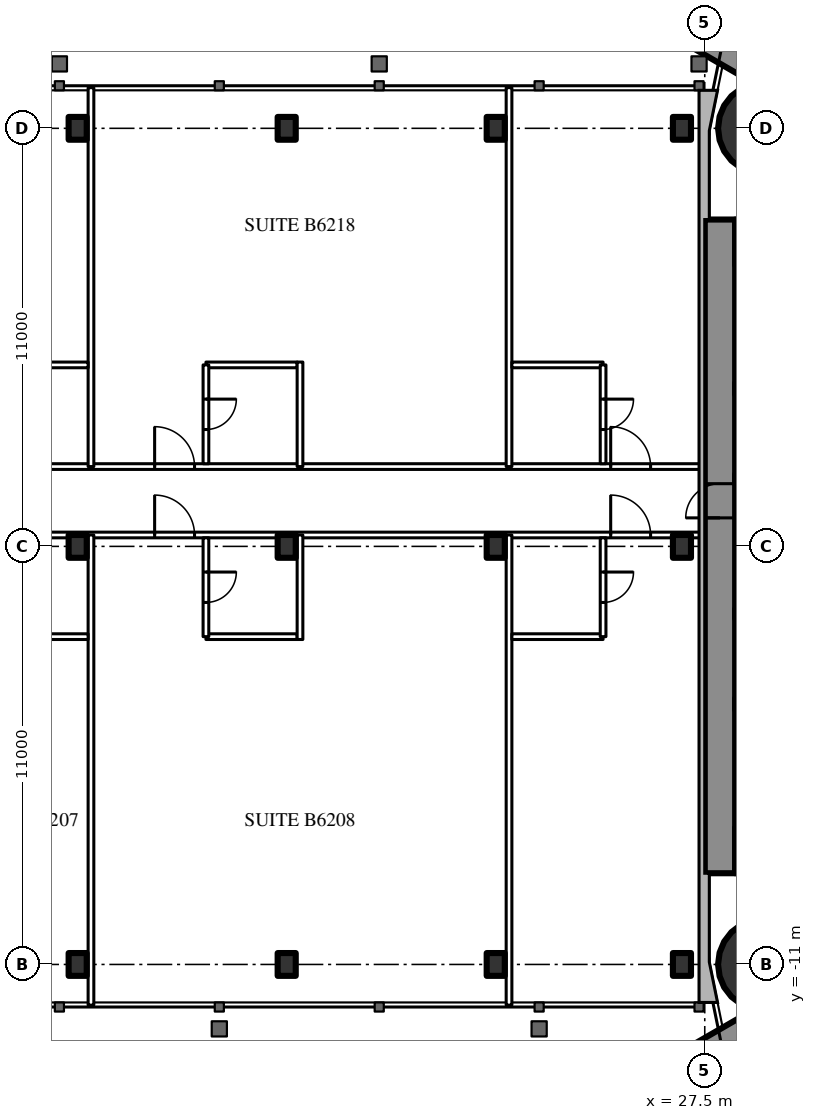
"""IFC4 building model, lengths in metres.
Left out: names, types, materials, properties, quantities, classifications, styles, units other than length and angle.
Written with IfcOpenShell. Run it as: python <this file> out.ifc"""

import sys

from ifc_helpers import new_model, si_unit, direction, frame, frame_2d, origin, origin_2d, place, context, subcontext, project, spatial, rectangle, circle, i_section, extrude, element, fill, save


model = new_model("IFC4")
c1 = context("Model", 3, precision=1e-05, world=origin(), true_north=direction((0.0, 1.0)))
c2 = subcontext(c1, "Body", "Model", "MODEL_VIEW")
j1 = project(units=[si_unit("LENGTHUNIT", "METRE"), si_unit("PLANEANGLEUNIT", "RADIAN")], contexts=[c1])
p1 = place(None, origin())
s1 = spatial("IfcSite", under=j1, at=p1, CompositionType="ELEMENT")
p2 = place(p1, origin())
s2 = spatial("IfcBuilding", under=s1, at=p2, CompositionType="ELEMENT")
p3 = place(p2, frame((0.0, 0.0, 233.3)))
s3 = spatial("IfcBuildingStorey", under=s2, at=p3, CompositionType="ELEMENT", Elevation=233.3)
for number, where, z_axis, x_axis in (
    (1, (29.05, 11.0, 0.0), (0.0, 0.0, 1.0), (1.0, 0.0, 0.0)),
    (2, (29.05, -11.0, 0.0), (0.0, 0.0, 1.0), (1.0, 0.0, 0.0)),
):
    element("IfcColumn", number, at=place(p3, frame(where, z_axis=z_axis, x_axis=x_axis)), inside=s3, PredefinedType="COLUMN", context=c2, shape_type="SweptSolid", body=[
        extrude(circle(Radius=1.2, at=origin_2d()), origin(), (0.0, 0.0, 1.0), 3.6),
    ])
p4 = place(p3, frame((27.9, -8.6, 0.0), z_axis=(0.0, 0.0, 1.0), x_axis=(0.0, 1.0, 0.0)))
e3 = element("IfcWall", 3, at=p4, inside=s3, PredefinedType="SHEAR", context=c2, shape_type="SweptSolid", body=[
    extrude(rectangle(XDim=17.2, YDim=0.8, at=frame_2d((8.6, 0.0))), origin(), (0.0, 0.0, 1.0), 3.6),
])
p5 = place(p4, frame((9.35, 0.0, 0.0)))
e4 = element("IfcOpeningElement", 4, at=p5, cuts=e3, PredefinedType="OPENING", context=c2, shape_type="SweptSolid", body=[
    extrude(rectangle(XDim=0.9, YDim=2.2, at=frame_2d((0.45, 1.1))), frame((0.0, 0.41, 0.0), z_axis=(0.0, -1.0, 0.0), x_axis=(1.0, 0.0, 0.0)), (0.0, 0.0, 1.0), 0.82),
])
p6 = place(p3, frame((28.3, -8.0, 0.0), z_axis=(0.0, 0.0, 1.0), x_axis=(1.0, 0.0, 0.0)))
e5 = element("IfcWall", 5, at=p6, inside=s3, PredefinedType="SHEAR", context=c2, shape_type="SweptSolid", body=[
    extrude(rectangle(XDim=8.4, YDim=1.2, at=frame_2d((4.2, 0.0))), origin(), (0.0, 0.0, 1.0), 3.6),
])
p7 = place(p6, frame((0.25, 0.0, 0.0)))
e6 = element("IfcOpeningElement", 6, at=p7, cuts=e5, PredefinedType="OPENING", context=c2, shape_type="SweptSolid", body=[
    extrude(rectangle(XDim=1.0, YDim=2.2, at=frame_2d((0.5, 1.1))), frame((0.0, 0.61, 0.0), z_axis=(0.0, -1.0, 0.0), x_axis=(1.0, 0.0, 0.0)), (0.0, 0.0, 1.0), 1.22),
])
p8 = place(p3, frame((28.3, 8.0, 0.0), z_axis=(0.0, 0.0, 1.0), x_axis=(1.0, 0.0, 0.0)))
e7 = element("IfcWall", 7, at=p8, inside=s3, PredefinedType="SHEAR", context=c2, shape_type="SweptSolid", body=[
    extrude(rectangle(XDim=8.4, YDim=1.2, at=frame_2d((4.2, 0.0))), origin(), (0.0, 0.0, 1.0), 3.6),
])
p9 = place(p8, frame((0.25, 0.0, 0.0)))
e8 = element("IfcOpeningElement", 8, at=p9, cuts=e7, PredefinedType="OPENING", context=c2, shape_type="SweptSolid", body=[
    extrude(rectangle(XDim=1.0, YDim=2.2, at=frame_2d((0.5, 1.1))), frame((0.0, 0.61, 0.0), z_axis=(0.0, -1.0, 0.0), x_axis=(1.0, 0.0, 0.0)), (0.0, 0.0, 1.0), 1.22),
])
for number, where, z_axis, x_axis in (
    (9, (28.3, -4.15, 0.0), (0.0, 0.0, 1.0), (1.0, 0.0, 0.0)),
    (10, (28.3, 4.15, 0.0), (0.0, 0.0, 1.0), (1.0, 0.0, 0.0)),
):
    element("IfcWall", number, at=place(p3, frame(where, z_axis=z_axis, x_axis=x_axis)), inside=s3, PredefinedType="SHEAR", context=c2, shape_type="SweptSolid", body=[
        extrude(rectangle(XDim=8.4, YDim=0.3, at=frame_2d((4.2, 0.0))), origin(), (0.0, 0.0, 1.0), 3.6),
    ])
for number, where, z_axis, x_axis in (
    (11, (28.3, -1.775, 0.0), (0.0, 0.0, 1.0), (1.0, 0.0, 0.0)),
    (12, (28.3, 1.775, 0.0), (0.0, 0.0, 1.0), (1.0, 0.0, 0.0)),
):
    element("IfcWall", number, at=place(p3, frame(where, z_axis=z_axis, x_axis=x_axis)), inside=s3, PredefinedType="SHEAR", context=c2, shape_type="SweptSolid", body=[
        extrude(rectangle(XDim=2.9, YDim=0.25, at=frame_2d((1.45, 0.0))), origin(), (0.0, 0.0, 1.0), 3.6),
    ])
p10 = place(p3, frame((27.2, -13.8, 0.0), z_axis=(0.0, 0.0, 1.0), x_axis=(0.866027159892, 0.499996958321, 0.0)))
e13 = element("IfcWall", 13, at=p10, inside=s3, PredefinedType="SHEAR", context=c2, shape_type="SweptSolid", body=[
    extrude(rectangle(XDim=27.947, YDim=1.2, at=frame_2d((13.973, 0.0))), origin(), (0.0, 0.0, 1.0), 3.6),
])
p11 = place(p10, frame((4.6, 0.0, 0.0)))
e14 = element("IfcOpeningElement", 14, at=p11, cuts=e13, PredefinedType="OPENING", context=c2, shape_type="SweptSolid", body=[
    extrude(rectangle(XDim=1.0, YDim=2.2, at=frame_2d((0.5, 1.1))), frame((0.0, 0.61, 0.0), z_axis=(0.0, -1.0, 0.0), x_axis=(1.0, 0.0, 0.0)), (0.0, 0.0, 1.0), 1.22),
])
p12 = place(p10, frame((13.395, 0.0, 0.0)))
e15 = element("IfcOpeningElement", 15, at=p12, cuts=e13, PredefinedType="OPENING", context=c2, shape_type="SweptSolid", body=[
    extrude(rectangle(XDim=1.8, YDim=2.2, at=frame_2d((0.9, 1.1))), frame((0.0, 0.61, 0.0), z_axis=(0.0, -1.0, 0.0), x_axis=(1.0, 0.0, 0.0)), (0.0, 0.0, 1.0), 1.22),
])
p13 = place(p3, frame((27.2, 13.8, 0.0), z_axis=(0.0, 0.0, 1.0), x_axis=(0.866024515034, -0.500001539357, 0.0)))
e16 = element("IfcWall", 16, at=p13, inside=s3, PredefinedType="SHEAR", context=c2, shape_type="SweptSolid", body=[
    extrude(rectangle(XDim=26.907, YDim=1.2, at=frame_2d((13.454, 0.0))), origin(), (0.0, 0.0, 1.0), 3.6),
])
p14 = place(p13, frame((4.6, 0.0, 0.0)))
e17 = element("IfcOpeningElement", 17, at=p14, cuts=e16, PredefinedType="OPENING", context=c2, shape_type="SweptSolid", body=[
    extrude(rectangle(XDim=1.0, YDim=2.2, at=frame_2d((0.5, 1.1))), frame((0.0, 0.61, 0.0), z_axis=(0.0, -1.0, 0.0), x_axis=(1.0, 0.0, 0.0)), (0.0, 0.0, 1.0), 1.22),
])
p15 = place(p13, frame((13.395, 0.0, 0.0)))
e18 = element("IfcOpeningElement", 18, at=p15, cuts=e16, PredefinedType="OPENING", context=c2, shape_type="SweptSolid", body=[
    extrude(rectangle(XDim=1.8, YDim=2.2, at=frame_2d((0.9, 1.1))), frame((0.0, 0.61, 0.0), z_axis=(0.0, -1.0, 0.0), x_axis=(1.0, 0.0, 0.0)), (0.0, 0.0, 1.0), 1.22),
])
for number, where, z_axis, x_axis in (
    (19, (11.0, -11.0, 0.0), (0.0, 0.0, 1.0), (1.0, 0.0, 0.0)),
    (20, (16.5, -11.0, 0.0), (0.0, 0.0, 1.0), (1.0, 0.0, 0.0)),
    (21, (22.0, -11.0, 0.0), (0.0, 0.0, 1.0), (1.0, 0.0, 0.0)),
    (22, (26.9, -11.0, 0.0), (0.0, 0.0, 1.0), (1.0, 0.0, 0.0)),
    (23, (11.0, 0.0, 0.0), (0.0, 0.0, 1.0), (1.0, 0.0, 0.0)),
    (24, (16.5, 0.0, 0.0), (0.0, 0.0, 1.0), (1.0, 0.0, 0.0)),
    (25, (22.0, 0.0, 0.0), (0.0, 0.0, 1.0), (1.0, 0.0, 0.0)),
    (26, (26.9, 0.0, 0.0), (0.0, 0.0, 1.0), (1.0, 0.0, 0.0)),
    (27, (11.0, 11.0, 0.0), (0.0, 0.0, 1.0), (1.0, 0.0, 0.0)),
    (28, (16.5, 11.0, 0.0), (0.0, 0.0, 1.0), (1.0, 0.0, 0.0)),
    (29, (22.0, 11.0, 0.0), (0.0, 0.0, 1.0), (1.0, 0.0, 0.0)),
    (30, (26.9, 11.0, 0.0), (0.0, 0.0, 1.0), (1.0, 0.0, 0.0)),
):
    element("IfcColumn", number, at=place(p3, frame(where, z_axis=z_axis, x_axis=x_axis)), inside=s3, PredefinedType="COLUMN", context=c2, shape_type="SweptSolid", body=[
        extrude(i_section(OverallWidth=0.476, OverallDepth=0.6, WebThickness=0.1, FlangeThickness=0.14, FilletRadius=0.02, at=origin_2d()), origin(), (0.0, 0.0, 1.0), 3.6),
    ])
p16 = place(p3, frame((-27.5, 0.3, 0.0), z_axis=(0.0, 0.0, 1.0), x_axis=(1.0, 0.0, 0.0)))
e31 = element("IfcWall", 31, at=p16, inside=s3, PredefinedType="PARTITIONING", context=c2, shape_type="SweptSolid", body=[
    extrude(rectangle(XDim=55.0, YDim=0.15, at=frame_2d((27.5, 0.0))), origin(), (0.0, 0.0, 1.0), 2.4),
])
p17 = place(p16, frame((1.575, 0.0, 0.0)))
e32 = element("IfcOpeningElement", 32, at=p17, cuts=e31, PredefinedType="OPENING", context=c2, shape_type="SweptSolid", body=[
    extrude(rectangle(XDim=1.0, YDim=2.2, at=frame_2d((0.5, 1.1))), frame((0.0, 0.085, 0.0), z_axis=(0.0, -1.0, 0.0), x_axis=(1.0, 0.0, 0.0)), (0.0, 0.0, 1.0), 0.17),
])
p18 = place(p16, frame((7.525, 0.0, 0.0)))
e33 = element("IfcOpeningElement", 33, at=p18, cuts=e31, PredefinedType="OPENING", context=c2, shape_type="SweptSolid", body=[
    extrude(rectangle(XDim=1.05, YDim=2.4, at=frame_2d((0.525, 1.2))), frame((0.0, 0.085, 0.0), z_axis=(0.0, -1.0, 0.0), x_axis=(1.0, 0.0, 0.0)), (0.0, 0.0, 1.0), 0.17),
])
p19 = place(p16, frame((18.525, 0.0, 0.0)))
e34 = element("IfcOpeningElement", 34, at=p19, cuts=e31, PredefinedType="OPENING", context=c2, shape_type="SweptSolid", body=[
    extrude(rectangle(XDim=1.05, YDim=2.4, at=frame_2d((0.525, 1.2))), frame((0.0, 0.085, 0.0), z_axis=(0.0, -1.0, 0.0), x_axis=(1.0, 0.0, 0.0)), (0.0, 0.0, 1.0), 0.17),
])
p20 = place(p16, frame((24.025, 0.0, 0.0)))
e35 = element("IfcOpeningElement", 35, at=p20, cuts=e31, PredefinedType="OPENING", context=c2, shape_type="SweptSolid", body=[
    extrude(rectangle(XDim=1.05, YDim=2.4, at=frame_2d((0.525, 1.2))), frame((0.0, 0.085, 0.0), z_axis=(0.0, -1.0, 0.0), x_axis=(1.0, 0.0, 0.0)), (0.0, 0.0, 1.0), 0.17),
])
p21 = place(p16, frame((35.025, 0.0, 0.0)))
e36 = element("IfcOpeningElement", 36, at=p21, cuts=e31, PredefinedType="OPENING", context=c2, shape_type="SweptSolid", body=[
    extrude(rectangle(XDim=1.05, YDim=2.4, at=frame_2d((0.525, 1.2))), frame((0.0, 0.085, 0.0), z_axis=(0.0, -1.0, 0.0), x_axis=(1.0, 0.0, 0.0)), (0.0, 0.0, 1.0), 0.17),
])
p22 = place(p16, frame((40.525, 0.0, 0.0)))
e37 = element("IfcOpeningElement", 37, at=p22, cuts=e31, PredefinedType="OPENING", context=c2, shape_type="SweptSolid", body=[
    extrude(rectangle(XDim=1.05, YDim=2.4, at=frame_2d((0.525, 1.2))), frame((0.0, 0.085, 0.0), z_axis=(0.0, -1.0, 0.0), x_axis=(1.0, 0.0, 0.0)), (0.0, 0.0, 1.0), 0.17),
])
p23 = place(p16, frame((52.525, 0.0, 0.0)))
e38 = element("IfcOpeningElement", 38, at=p23, cuts=e31, PredefinedType="OPENING", context=c2, shape_type="SweptSolid", body=[
    extrude(rectangle(XDim=1.05, YDim=2.4, at=frame_2d((0.525, 1.2))), frame((0.0, 0.085, 0.0), z_axis=(0.0, -1.0, 0.0), x_axis=(1.0, 0.0, 0.0)), (0.0, 0.0, 1.0), 0.17),
])
p24 = place(p3, frame((5.85, 2.1, 0.0), z_axis=(0.0, 0.0, 1.0), x_axis=(1.0, 0.0, 0.0)))
e39 = element("IfcWall", 39, at=p24, inside=s3, PredefinedType="PARTITIONING", context=c2, shape_type="SweptSolid", body=[
    extrude(rectangle(XDim=21.65, YDim=0.15, at=frame_2d((10.825, 0.0))), origin(), (0.0, 0.0, 1.0), 3.4),
])
p25 = place(p24, frame((1.675, 0.0, 0.0)))
e40 = element("IfcOpeningElement", 40, at=p25, cuts=e39, PredefinedType="OPENING", context=c2, shape_type="SweptSolid", body=[
    extrude(rectangle(XDim=1.05, YDim=2.4, at=frame_2d((0.525, 1.2))), frame((0.0, 0.085, 0.0), z_axis=(0.0, -1.0, 0.0), x_axis=(1.0, 0.0, 0.0)), (0.0, 0.0, 1.0), 0.17),
])
p26 = place(p24, frame((7.175, 0.0, 0.0)))
e41 = element("IfcOpeningElement", 41, at=p26, cuts=e39, PredefinedType="OPENING", context=c2, shape_type="SweptSolid", body=[
    extrude(rectangle(XDim=1.05, YDim=2.4, at=frame_2d((0.525, 1.2))), frame((0.0, 0.085, 0.0), z_axis=(0.0, -1.0, 0.0), x_axis=(1.0, 0.0, 0.0)), (0.0, 0.0, 1.0), 0.17),
])
p27 = place(p24, frame((19.175, 0.0, 0.0)))
e42 = element("IfcOpeningElement", 42, at=p27, cuts=e39, PredefinedType="OPENING", context=c2, shape_type="SweptSolid", body=[
    extrude(rectangle(XDim=1.05, YDim=2.4, at=frame_2d((0.525, 1.2))), frame((0.0, 0.085, 0.0), z_axis=(0.0, -1.0, 0.0), x_axis=(1.0, 0.0, 0.0)), (0.0, 0.0, 1.0), 0.17),
])
for number, where, z_axis, x_axis in (
    (43, (11.35, -12.07, 0.0), (0.0, 0.0, 1.0), (0.0, 1.0, 0.0)),
    (44, (22.35, -12.07, 0.0), (0.0, 0.0, 1.0), (0.0, 1.0, 0.0)),
):
    element("IfcWall", number, at=place(p3, frame(where, z_axis=z_axis, x_axis=x_axis)), inside=s3, PredefinedType="PARTITIONING", context=c2, shape_type="SweptSolid", body=[
        extrude(rectangle(XDim=12.37, YDim=0.15, at=frame_2d((6.185, 0.0))), origin(), (0.0, 0.0, 1.0), 3.4),
    ])
for number, where, z_axis, x_axis in (
    (45, (8.875, -2.375, 0.0), (0.0, 0.0, 1.0), (1.0, 0.0, 0.0)),
    (46, (14.375, -2.375, 0.0), (0.0, 0.0, 1.0), (1.0, 0.0, 0.0)),
):
    element("IfcWall", number, at=place(p3, frame(where, z_axis=z_axis, x_axis=x_axis)), inside=s3, PredefinedType="PARTITIONING", context=c2, shape_type="SweptSolid", body=[
        extrude(rectangle(XDim=2.4, YDim=0.15, at=frame_2d((1.2, 0.0))), origin(), (0.0, 0.0, 1.0), 3.4),
    ])
p28 = place(p3, frame((14.375, -2.375, 0.0), z_axis=(0.0, 0.0, 1.0), x_axis=(0.0, 1.0, 0.0)))
e47 = element("IfcWall", 47, at=p28, inside=s3, PredefinedType="PARTITIONING", context=c2, shape_type="SweptSolid", body=[
    extrude(rectangle(XDim=2.6, YDim=0.15, at=frame_2d((1.3, 0.0))), origin(), (0.0, 0.0, 1.0), 3.4),
])
p29 = place(p28, frame((0.9, 0.0, 0.0)))
e48 = element("IfcOpeningElement", 48, at=p29, cuts=e47, PredefinedType="OPENING", context=c2, shape_type="SweptSolid", body=[
    extrude(rectangle(XDim=0.8, YDim=2.2, at=frame_2d((0.4, 1.1))), frame((0.0, 0.085, 0.0), z_axis=(0.0, -1.0, 0.0), x_axis=(1.0, 0.0, 0.0)), (0.0, 0.0, 1.0), 0.17),
])
p30 = place(p3, frame((22.425, -2.375, 0.0), z_axis=(0.0, 0.0, 1.0), x_axis=(1.0, 0.0, 0.0)))
e49 = element("IfcWall", 49, at=p30, inside=s3, PredefinedType="PARTITIONING", context=c2, shape_type="SweptSolid", body=[
    extrude(rectangle(XDim=2.4, YDim=0.15, at=frame_2d((1.2, 0.0))), origin(), (0.0, 0.0, 1.0), 3.4),
])
p31 = place(p3, frame((24.825, -2.375, 0.0), z_axis=(0.0, 0.0, 1.0), x_axis=(0.0, 1.0, 0.0)))
e50 = element("IfcWall", 50, at=p31, inside=s3, PredefinedType="PARTITIONING", context=c2, shape_type="SweptSolid", body=[
    extrude(rectangle(XDim=2.6, YDim=0.15, at=frame_2d((1.3, 0.0))), origin(), (0.0, 0.0, 1.0), 3.4),
])
p32 = place(p31, frame((0.9, 0.0, 0.0)))
e51 = element("IfcOpeningElement", 51, at=p32, cuts=e50, PredefinedType="OPENING", context=c2, shape_type="SweptSolid", body=[
    extrude(rectangle(XDim=0.8, YDim=2.2, at=frame_2d((0.4, 1.1))), frame((0.0, 0.085, 0.0), z_axis=(0.0, -1.0, 0.0), x_axis=(1.0, 0.0, 0.0)), (0.0, 0.0, 1.0), 0.17),
])
for number, where, z_axis, x_axis in (
    (52, (11.35, 2.1, 0.0), (0.0, 0.0, 1.0), (0.0, 1.0, 0.0)),
    (53, (22.35, 2.1, 0.0), (0.0, 0.0, 1.0), (0.0, 1.0, 0.0)),
):
    element("IfcWall", number, at=place(p3, frame(where, z_axis=z_axis, x_axis=x_axis)), inside=s3, PredefinedType="PARTITIONING", context=c2, shape_type="SweptSolid", body=[
        extrude(rectangle(XDim=9.97, YDim=0.15, at=frame_2d((4.985, 0.0))), origin(), (0.0, 0.0, 1.0), 3.4),
    ])
for number, where, z_axis, x_axis in (
    (54, (8.875, 4.775, 0.0), (0.0, 0.0, 1.0), (1.0, 0.0, 0.0)),
    (55, (14.375, 4.775, 0.0), (0.0, 0.0, 1.0), (1.0, 0.0, 0.0)),
):
    element("IfcWall", number, at=place(p3, frame(where, z_axis=z_axis, x_axis=x_axis)), inside=s3, PredefinedType="PARTITIONING", context=c2, shape_type="SweptSolid", body=[
        extrude(rectangle(XDim=2.4, YDim=0.15, at=frame_2d((1.2, 0.0))), origin(), (0.0, 0.0, 1.0), 3.4),
    ])
p33 = place(p3, frame((14.375, 2.175, 0.0), z_axis=(0.0, 0.0, 1.0), x_axis=(0.0, 1.0, 0.0)))
e56 = element("IfcWall", 56, at=p33, inside=s3, PredefinedType="PARTITIONING", context=c2, shape_type="SweptSolid", body=[
    extrude(rectangle(XDim=2.6, YDim=0.15, at=frame_2d((1.3, 0.0))), origin(), (0.0, 0.0, 1.0), 3.4),
])
p34 = place(p33, frame((0.9, 0.0, 0.0)))
e57 = element("IfcOpeningElement", 57, at=p34, cuts=e56, PredefinedType="OPENING", context=c2, shape_type="SweptSolid", body=[
    extrude(rectangle(XDim=0.8, YDim=2.2, at=frame_2d((0.4, 1.1))), frame((0.0, 0.085, 0.0), z_axis=(0.0, -1.0, 0.0), x_axis=(1.0, 0.0, 0.0)), (0.0, 0.0, 1.0), 0.17),
])
p35 = place(p3, frame((22.425, 4.775, 0.0), z_axis=(0.0, 0.0, 1.0), x_axis=(1.0, 0.0, 0.0)))
e58 = element("IfcWall", 58, at=p35, inside=s3, PredefinedType="PARTITIONING", context=c2, shape_type="SweptSolid", body=[
    extrude(rectangle(XDim=2.4, YDim=0.15, at=frame_2d((1.2, 0.0))), origin(), (0.0, 0.0, 1.0), 3.4),
])
p36 = place(p3, frame((24.825, 2.175, 0.0), z_axis=(0.0, 0.0, 1.0), x_axis=(0.0, 1.0, 0.0)))
e59 = element("IfcWall", 59, at=p36, inside=s3, PredefinedType="PARTITIONING", context=c2, shape_type="SweptSolid", body=[
    extrude(rectangle(XDim=2.6, YDim=0.15, at=frame_2d((1.3, 0.0))), origin(), (0.0, 0.0, 1.0), 3.4),
])
p37 = place(p36, frame((0.9, 0.0, 0.0)))
e60 = element("IfcOpeningElement", 60, at=p37, cuts=e59, PredefinedType="OPENING", context=c2, shape_type="SweptSolid", body=[
    extrude(rectangle(XDim=0.8, YDim=2.2, at=frame_2d((0.4, 1.1))), frame((0.0, 0.085, 0.0), z_axis=(0.0, -1.0, 0.0), x_axis=(1.0, 0.0, 0.0)), (0.0, 0.0, 1.0), 0.17),
])
for number, where, z_axis, x_axis in (
    (61, (16.85, -2.45, 0.0), (0.0, 0.0, 1.0), (0.0, 1.0, 0.0)),
    (62, (16.85, 2.1, 0.0), (0.0, 0.0, 1.0), (0.0, 1.0, 0.0)),
):
    element("IfcWall", number, at=place(p3, frame(where, z_axis=z_axis, x_axis=x_axis)), inside=s3, PredefinedType="PARTITIONING", context=c2, shape_type="SweptSolid", body=[
        extrude(rectangle(XDim=2.75, YDim=0.15, at=frame_2d((1.375, 0.0))), origin(), (0.0, 0.0, 1.0), 3.4),
    ])
p38 = place(p5, origin())
e63 = element("IfcDoor", 63, at=p38, inside=s3, OperationType="SINGLE_SWING_LEFT", PredefinedType="DOOR", context=c2, shape_type="SweptSolid", body=[
    extrude(rectangle(XDim=0.9, YDim=2.2, at=frame_2d((0.45, 1.1))), frame((0.0, 0.025, 0.0), z_axis=(0.0, -1.0, 0.0), x_axis=(1.0, 0.0, 0.0)), (0.0, 0.0, 1.0), 0.05),
])
fill(e4, e63)
p39 = place(p29, origin())
e64 = element("IfcDoor", 64, at=p39, inside=s3, OperationType="SINGLE_SWING_RIGHT", PredefinedType="DOOR", context=c2, shape_type="SweptSolid", body=[
    extrude(rectangle(XDim=0.8, YDim=2.2, at=frame_2d((0.4, 1.1))), frame((0.0, 0.025, 0.0), z_axis=(0.0, -1.0, 0.0), x_axis=(1.0, 0.0, 0.0)), (0.0, 0.0, 1.0), 0.05),
])
fill(e48, e64)
p40 = place(p22, origin())
e65 = element("IfcDoor", 65, at=p40, inside=s3, OperationType="SINGLE_SWING_LEFT", PredefinedType="DOOR", context=c2, shape_type="SweptSolid", body=[
    extrude(rectangle(XDim=1.05, YDim=2.4, at=frame_2d((0.525, 1.2))), frame((0.0, 0.025, 0.0), z_axis=(0.0, -1.0, 0.0), x_axis=(1.0, 0.0, 0.0)), (0.0, 0.0, 1.0), 0.05),
])
fill(e37, e65)
p41 = place(p32, origin())
e66 = element("IfcDoor", 66, at=p41, inside=s3, OperationType="SINGLE_SWING_RIGHT", PredefinedType="DOOR", context=c2, shape_type="SweptSolid", body=[
    extrude(rectangle(XDim=0.8, YDim=2.2, at=frame_2d((0.4, 1.1))), frame((0.0, 0.025, 0.0), z_axis=(0.0, -1.0, 0.0), x_axis=(1.0, 0.0, 0.0)), (0.0, 0.0, 1.0), 0.05),
])
fill(e51, e66)
p42 = place(p23, origin())
e67 = element("IfcDoor", 67, at=p42, inside=s3, OperationType="SINGLE_SWING_LEFT", PredefinedType="DOOR", context=c2, shape_type="SweptSolid", body=[
    extrude(rectangle(XDim=1.05, YDim=2.4, at=frame_2d((0.525, 1.2))), frame((0.0, 0.025, 0.0), z_axis=(0.0, -1.0, 0.0), x_axis=(1.0, 0.0, 0.0)), (0.0, 0.0, 1.0), 0.05),
])
fill(e38, e67)
p43 = place(p34, origin())
e68 = element("IfcDoor", 68, at=p43, inside=s3, OperationType="SINGLE_SWING_RIGHT", PredefinedType="DOOR", context=c2, shape_type="SweptSolid", body=[
    extrude(rectangle(XDim=0.8, YDim=2.2, at=frame_2d((0.4, 1.1))), frame((0.0, 0.025, 0.0), z_axis=(0.0, -1.0, 0.0), x_axis=(1.0, 0.0, 0.0)), (0.0, 0.0, 1.0), 0.05),
])
fill(e57, e68)
p44 = place(p26, origin())
e69 = element("IfcDoor", 69, at=p44, inside=s3, OperationType="SINGLE_SWING_LEFT", PredefinedType="DOOR", context=c2, shape_type="SweptSolid", body=[
    extrude(rectangle(XDim=1.05, YDim=2.4, at=frame_2d((0.525, 1.2))), frame((0.0, 0.025, 0.0), z_axis=(0.0, -1.0, 0.0), x_axis=(1.0, 0.0, 0.0)), (0.0, 0.0, 1.0), 0.05),
])
fill(e41, e69)
p45 = place(p37, origin())
e70 = element("IfcDoor", 70, at=p45, inside=s3, OperationType="SINGLE_SWING_RIGHT", PredefinedType="DOOR", context=c2, shape_type="SweptSolid", body=[
    extrude(rectangle(XDim=0.8, YDim=2.2, at=frame_2d((0.4, 1.1))), frame((0.0, 0.025, 0.0), z_axis=(0.0, -1.0, 0.0), x_axis=(1.0, 0.0, 0.0)), (0.0, 0.0, 1.0), 0.05),
])
fill(e60, e70)
p46 = place(p27, origin())
e71 = element("IfcDoor", 71, at=p46, inside=s3, OperationType="SINGLE_SWING_LEFT", PredefinedType="DOOR", context=c2, shape_type="SweptSolid", body=[
    extrude(rectangle(XDim=1.05, YDim=2.4, at=frame_2d((0.525, 1.2))), frame((0.0, 0.025, 0.0), z_axis=(0.0, -1.0, 0.0), x_axis=(1.0, 0.0, 0.0)), (0.0, 0.0, 1.0), 0.05),
])
fill(e42, e71)
save(model, sys.argv[1])
